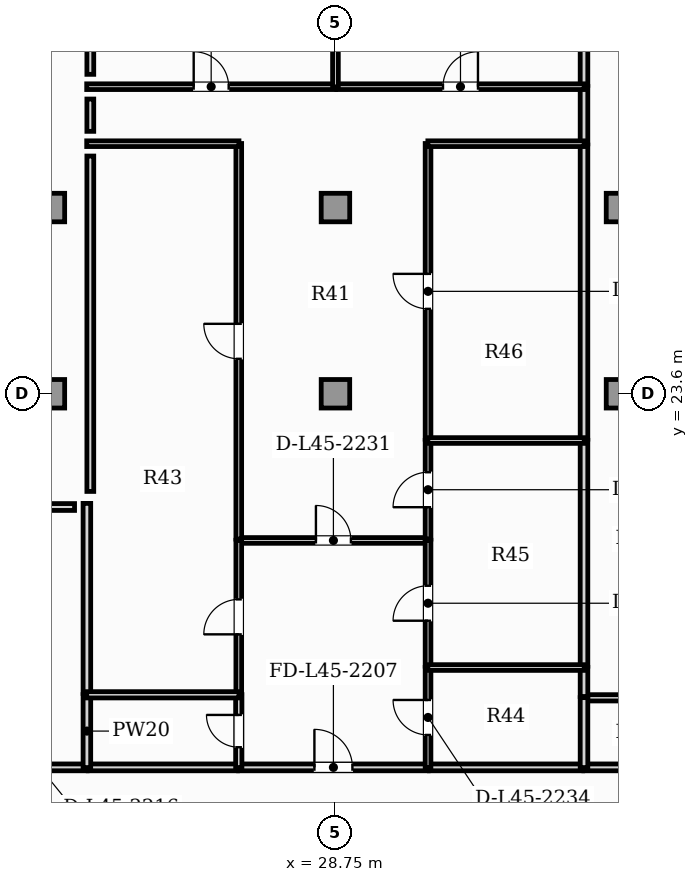
"""IFC4 building model, lengths in metres.
Left out: names, types, materials, properties, quantities, classifications, styles, units other than length and angle.
Written with IfcOpenShell. Run it as: python <this file> out.ifc"""

import sys

from ifc_helpers import new_model, si_unit, direction, frame, frame_2d, origin, origin_2d, place, context, subcontext, project, spatial, rectangle, extrude, element, fill, save


model = new_model("IFC4")
c1 = context("Model", 3, precision=1e-05, world=origin(), true_north=direction((0.0, 1.0)))
c2 = subcontext(c1, "Body", "Model", "MODEL_VIEW")
j1 = project(units=[si_unit("LENGTHUNIT", "METRE"), si_unit("PLANEANGLEUNIT", "RADIAN")], contexts=[c1])
p1 = place(None, origin())
s1 = spatial("IfcSite", under=j1, at=p1, CompositionType="ELEMENT")
p2 = place(p1, origin())
s2 = spatial("IfcBuilding", under=s1, at=p2, CompositionType="ELEMENT")
p3 = place(p2, frame((0.0, 0.0, 183.7)))
s3 = spatial("IfcBuildingStorey", under=s2, at=p3, CompositionType="ELEMENT", Elevation=183.7)
for number, where, z_axis, x_axis in (
    (1, (21.25, 23.6, 0.0), (0.0, 0.0, 1.0), (1.0, 0.0, 0.0)),
    (2, (28.75, 23.6, 0.0), (0.0, 0.0, 1.0), (1.0, 0.0, 0.0)),
    (3, (36.25, 23.6, 0.0), (0.0, 0.0, 1.0), (1.0, 0.0, 0.0)),
    (4, (21.25, 28.5, 0.0), (0.0, 0.0, 1.0), (1.0, 0.0, 0.0)),
    (5, (28.75, 28.5, 0.0), (0.0, 0.0, 1.0), (1.0, 0.0, 0.0)),
    (6, (36.25, 28.5, 0.0), (0.0, 0.0, 1.0), (1.0, 0.0, 0.0)),
):
    element("IfcColumn", number, at=place(p3, frame(where, z_axis=z_axis, x_axis=x_axis)), inside=s3, PredefinedType="COLUMN", context=c2, shape_type="SweptSolid", body=[
        extrude(rectangle(XDim=0.75, YDim=0.75, at=origin_2d()), origin(), (0.0, 0.0, 1.0), 3.85),
    ])
p4 = place(p3, frame((20.645, 13.77, 0.0), z_axis=(0.0, 0.0, 1.0), x_axis=(1.0, 0.0, 0.0)))
e7 = element("IfcWall", 7, at=p4, inside=s3, PredefinedType="PARTITIONING", context=c2, shape_type="SweptSolid", body=[
    extrude(rectangle(XDim=1.57, YDim=0.18, at=frame_2d((0.785, 0.0))), origin(), (0.0, 0.0, 1.0), 3.63),
])
p5 = place(p3, frame((35.285, 13.77, 0.0), z_axis=(0.0, 0.0, 1.0), x_axis=(1.0, 0.0, 0.0)))
e8 = element("IfcWall", 8, at=p5, inside=s3, PredefinedType="PARTITIONING", context=c2, shape_type="SweptSolid", body=[
    extrude(rectangle(XDim=5.57, YDim=0.18, at=frame_2d((2.785, 0.0))), origin(), (0.0, 0.0, 1.0), 3.63),
])
p6 = place(p3, frame((26.201, 13.77, 0.0), z_axis=(0.0, 0.0, 1.0), x_axis=(1.0, 0.0, 0.0)))
e9 = element("IfcWall", 9, at=p6, inside=s3, PredefinedType="PARTITIONING", context=c2, shape_type="SweptSolid", body=[
    extrude(rectangle(XDim=4.99, YDim=0.18, at=frame_2d((2.495, 0.0))), origin(), (0.0, 0.0, 1.0), 3.63),
])
p7 = place(p6, frame((1.995, 0.0, 0.0)))
e10 = element("IfcOpeningElement", 10, at=p7, cuts=e9, PredefinedType="OPENING", context=c2, shape_type="SweptSolid", body=[
    extrude(rectangle(XDim=1.0, YDim=2.15, at=frame_2d((0.5, 1.075))), frame((0.0, 0.1, 0.0), z_axis=(0.0, -1.0, 0.0), x_axis=(1.0, 0.0, 0.0)), (0.0, 0.0, 1.0), 0.2),
])
p8 = place(p3, frame((22.245, 13.77, 0.0), z_axis=(0.0, 0.0, 1.0), x_axis=(1.0, 0.0, 0.0)))
e11 = element("IfcWall", 11, at=p8, inside=s3, PredefinedType="PARTITIONING", context=c2, shape_type="SweptSolid", body=[
    extrude(rectangle(XDim=3.926, YDim=0.18, at=frame_2d((1.963, 0.0))), origin(), (0.0, 0.0, 1.0), 3.63),
])
p9 = place(p3, frame((31.221, 13.77, 0.0), z_axis=(0.0, 0.0, 1.0), x_axis=(1.0, 0.0, 0.0)))
e12 = element("IfcWall", 12, at=p9, inside=s3, PredefinedType="PARTITIONING", context=c2, shape_type="SweptSolid", body=[
    extrude(rectangle(XDim=4.034, YDim=0.18, at=frame_2d((2.017, 0.0))), origin(), (0.0, 0.0, 1.0), 3.63),
])
p10 = place(p3, frame((22.21, 13.765, 0.0), z_axis=(0.0, 0.0, 1.0), x_axis=(0.0, 1.0, 0.0)))
e13 = element("IfcWall", 13, at=p10, inside=s3, PredefinedType="PARTITIONING", context=c2, shape_type="SweptSolid", body=[
    extrude(rectangle(XDim=1.919, YDim=0.2, at=frame_2d((0.96, 0.0))), origin(), (0.0, 0.0, 1.0), 3.63),
])
p11 = place(p3, frame((22.21, 15.714, 0.0), z_axis=(0.0, 0.0, 1.0), x_axis=(0.0, 1.0, 0.0)))
e14 = element("IfcWall", 14, at=p11, inside=s3, PredefinedType="PARTITIONING", context=c2, shape_type="SweptSolid", body=[
    extrude(rectangle(XDim=5.001, YDim=0.2, at=frame_2d((2.5, 0.0))), origin(), (0.0, 0.0, 1.0), 3.63),
])
p12 = place(p3, frame((35.285, 15.6, 0.0), z_axis=(0.0, 0.0, 1.0), x_axis=(1.0, 0.0, 0.0)))
e15 = element("IfcWall", 15, at=p12, inside=s3, PredefinedType="PLUMBINGWALL", context=c2, shape_type="SweptSolid", body=[
    extrude(rectangle(XDim=5.61, YDim=0.165, at=frame_2d((2.805, 0.0))), origin(), (0.0, 0.0, 1.0), 3.63),
])
p13 = place(p3, frame((35.29, 13.765, 0.0), z_axis=(0.0, 0.0, 1.0), x_axis=(0.0, 1.0, 0.0)))
e16 = element("IfcWall", 16, at=p13, inside=s3, PredefinedType="PARTITIONING", context=c2, shape_type="SweptSolid", body=[
    extrude(rectangle(XDim=1.84, YDim=0.2, at=frame_2d((0.92, 0.0))), origin(), (0.0, 0.0, 1.0), 3.63),
])
p14 = place(p3, frame((35.29, 30.175, 0.0), z_axis=(0.0, 0.0, 1.0), x_axis=(0.0, 1.0, 0.0)))
e17 = element("IfcWall", 17, at=p14, inside=s3, PredefinedType="PARTITIONING", context=c2, shape_type="SweptSolid", body=[
    extrude(rectangle(XDim=1.51, YDim=0.2, at=frame_2d((0.755, 0.0))), origin(), (0.0, 0.0, 1.0), 3.63),
])
p15 = place(p3, frame((35.29, 15.635, 0.0), z_axis=(0.0, 0.0, 1.0), x_axis=(0.0, 1.0, 0.0)))
e18 = element("IfcWall", 18, at=p15, inside=s3, PredefinedType="PARTITIONING", context=c2, shape_type="SweptSolid", body=[
    extrude(rectangle(XDim=0.767, YDim=0.2, at=frame_2d((0.383, 0.0))), origin(), (0.0, 0.0, 1.0), 3.63),
])
p16 = place(p3, frame((35.29, 16.432, 0.0), z_axis=(0.0, 0.0, 1.0), x_axis=(0.0, 1.0, 0.0)))
e19 = element("IfcWall", 19, at=p16, inside=s3, PredefinedType="PARTITIONING", context=c2, shape_type="SweptSolid", body=[
    extrude(rectangle(XDim=5.943, YDim=0.2, at=frame_2d((2.972, 0.0))), origin(), (0.0, 0.0, 1.0), 3.63),
])
p17 = place(p3, frame((35.29, 22.405, 0.0), z_axis=(0.0, 0.0, 1.0), x_axis=(0.0, 1.0, 0.0)))
e20 = element("IfcWall", 20, at=p17, inside=s3, PredefinedType="PARTITIONING", context=c2, shape_type="SweptSolid", body=[
    extrude(rectangle(XDim=7.74, YDim=0.2, at=frame_2d((3.87, 0.0))), origin(), (0.0, 0.0, 1.0), 3.63),
])
p18 = place(p3, frame((35.29, 31.715, 0.0), z_axis=(0.0, 0.0, 1.0), x_axis=(0.0, 1.0, 0.0)))
e21 = element("IfcWall", 21, at=p18, inside=s3, PredefinedType="PARTITIONING", context=c2, shape_type="SweptSolid", body=[
    extrude(rectangle(XDim=1.75, YDim=0.2, at=frame_2d((0.875, 0.0))), origin(), (0.0, 0.0, 1.0), 3.63),
])
p19 = place(p3, frame((26.201, 19.741, 0.0), z_axis=(0.0, 0.0, 1.0), x_axis=(1.0, 0.0, 0.0)))
e22 = element("IfcWall", 22, at=p19, inside=s3, PredefinedType="PARTITIONING", context=c2, shape_type="SweptSolid", body=[
    extrude(rectangle(XDim=4.99, YDim=0.15, at=frame_2d((2.495, 0.0))), origin(), (0.0, 0.0, 1.0), 3.63),
])
p20 = place(p19, frame((2.035, 0.0, 0.0)))
e23 = element("IfcOpeningElement", 23, at=p20, cuts=e22, PredefinedType="OPENING", context=c2, shape_type="SweptSolid", body=[
    extrude(rectangle(XDim=0.92, YDim=2.1, at=frame_2d((0.46, 1.05))), frame((0.0, 0.085, 0.0), z_axis=(0.0, -1.0, 0.0), x_axis=(1.0, 0.0, 0.0)), (0.0, 0.0, 1.0), 0.17),
])
p21 = place(p3, frame((26.206, 13.765, 0.0), z_axis=(0.0, 0.0, 1.0), x_axis=(0.0, 1.0, 0.0)))
e24 = element("IfcWall", 24, at=p21, inside=s3, PredefinedType="PLUMBINGWALL", context=c2, shape_type="SweptSolid", body=[
    extrude(rectangle(XDim=1.919, YDim=0.165, at=frame_2d((0.96, 0.0))), origin(), (0.0, 0.0, 1.0), 3.63),
])
p22 = place(p21, frame((0.535, 0.0, 0.0)))
e25 = element("IfcOpeningElement", 25, at=p22, cuts=e24, PredefinedType="OPENING", context=c2, shape_type="SweptSolid", body=[
    extrude(rectangle(XDim=0.85, YDim=2.1, at=frame_2d((0.425, 1.05))), frame((0.0, 0.093, 0.0), z_axis=(0.0, -1.0, 0.0), x_axis=(1.0, 0.0, 0.0)), (0.0, 0.0, 1.0), 0.185),
])
p23 = place(p3, frame((26.206, 15.714, 0.0), z_axis=(0.0, 0.0, 1.0), x_axis=(0.0, 1.0, 0.0)))
e26 = element("IfcWall", 26, at=p23, inside=s3, PredefinedType="PARTITIONING", context=c2, shape_type="SweptSolid", body=[
    extrude(rectangle(XDim=4.031, YDim=0.15, at=frame_2d((2.016, 0.0))), origin(), (0.0, 0.0, 1.0), 3.63),
])
p24 = place(p23, frame((1.556, 0.0, 0.0)))
e27 = element("IfcOpeningElement", 27, at=p24, cuts=e26, PredefinedType="OPENING", context=c2, shape_type="SweptSolid", body=[
    extrude(rectangle(XDim=0.92, YDim=2.1, at=frame_2d((0.46, 1.05))), frame((0.0, 0.085, 0.0), z_axis=(0.0, -1.0, 0.0), x_axis=(1.0, 0.0, 0.0)), (0.0, 0.0, 1.0), 0.17),
])
p25 = place(p3, frame((31.186, 13.765, 0.0), z_axis=(0.0, 0.0, 1.0), x_axis=(0.0, 1.0, 0.0)))
e28 = element("IfcWall", 28, at=p25, inside=s3, PredefinedType="PARTITIONING", context=c2, shape_type="SweptSolid", body=[
    extrude(rectangle(XDim=2.637, YDim=0.15, at=frame_2d((1.318, 0.0))), origin(), (0.0, 0.0, 1.0), 3.63),
])
p26 = place(p25, frame((0.858, 0.0, 0.0)))
e29 = element("IfcOpeningElement", 29, at=p26, cuts=e28, PredefinedType="OPENING", context=c2, shape_type="SweptSolid", body=[
    extrude(rectangle(XDim=0.92, YDim=2.1, at=frame_2d((0.46, 1.05))), frame((0.0, 0.085, 0.0), z_axis=(0.0, -1.0, 0.0), x_axis=(1.0, 0.0, 0.0)), (0.0, 0.0, 1.0), 0.17),
])
p27 = place(p3, frame((31.186, 16.432, 0.0), z_axis=(0.0, 0.0, 1.0), x_axis=(0.0, 1.0, 0.0)))
e30 = element("IfcWall", 30, at=p27, inside=s3, PredefinedType="PARTITIONING", context=c2, shape_type="SweptSolid", body=[
    extrude(rectangle(XDim=3.314, YDim=0.15, at=frame_2d((1.657, 0.0))), origin(), (0.0, 0.0, 1.0), 3.63),
])
p28 = place(p27, frame((1.197, 0.0, 0.0)))
e31 = element("IfcOpeningElement", 31, at=p28, cuts=e30, PredefinedType="OPENING", context=c2, shape_type="SweptSolid", body=[
    extrude(rectangle(XDim=0.92, YDim=2.1, at=frame_2d((0.46, 1.05))), frame((0.0, 0.085, 0.0), z_axis=(0.0, -1.0, 0.0), x_axis=(1.0, 0.0, 0.0)), (0.0, 0.0, 1.0), 0.17),
])
p29 = place(p3, frame((26.206, 19.776, 0.0), z_axis=(0.0, 0.0, 1.0), x_axis=(0.0, 1.0, 0.0)))
e32 = element("IfcWall", 32, at=p29, inside=s3, PredefinedType="PARTITIONING", context=c2, shape_type="SweptSolid", body=[
    extrude(rectangle(XDim=10.409, YDim=0.15, at=frame_2d((5.205, 0.0))), origin(), (0.0, 0.0, 1.0), 3.63),
])
p30 = place(p29, frame((4.745, 0.0, 0.0)))
e33 = element("IfcOpeningElement", 33, at=p30, cuts=e32, PredefinedType="OPENING", context=c2, shape_type="SweptSolid", body=[
    extrude(rectangle(XDim=0.92, YDim=2.1, at=frame_2d((0.46, 1.05))), frame((0.0, 0.085, 0.0), z_axis=(0.0, -1.0, 0.0), x_axis=(1.0, 0.0, 0.0)), (0.0, 0.0, 1.0), 0.17),
])
p31 = place(p3, frame((22.205, 30.18, 0.0), z_axis=(0.0, 0.0, 1.0), x_axis=(1.0, 0.0, 0.0)))
e34 = element("IfcWall", 34, at=p31, inside=s3, PredefinedType="PARTITIONING", context=c2, shape_type="SweptSolid", body=[
    extrude(rectangle(XDim=4.006, YDim=0.15, at=frame_2d((2.003, 0.0))), origin(), (0.0, 0.0, 1.0), 3.63),
])
p32 = place(p3, frame((31.186, 19.776, 0.0), z_axis=(0.0, 0.0, 1.0), x_axis=(0.0, 1.0, 0.0)))
e35 = element("IfcWall", 35, at=p32, inside=s3, PredefinedType="PARTITIONING", context=c2, shape_type="SweptSolid", body=[
    extrude(rectangle(XDim=2.599, YDim=0.15, at=frame_2d((1.3, 0.0))), origin(), (0.0, 0.0, 1.0), 3.63),
])
p33 = place(p32, frame((0.84, 0.0, 0.0)))
e36 = element("IfcOpeningElement", 36, at=p33, cuts=e35, PredefinedType="OPENING", context=c2, shape_type="SweptSolid", body=[
    extrude(rectangle(XDim=0.92, YDim=2.1, at=frame_2d((0.46, 1.05))), frame((0.0, 0.085, 0.0), z_axis=(0.0, -1.0, 0.0), x_axis=(1.0, 0.0, 0.0)), (0.0, 0.0, 1.0), 0.17),
])
p34 = place(p3, frame((31.186, 22.405, 0.0), z_axis=(0.0, 0.0, 1.0), x_axis=(0.0, 1.0, 0.0)))
e37 = element("IfcWall", 37, at=p34, inside=s3, PredefinedType="PARTITIONING", context=c2, shape_type="SweptSolid", body=[
    extrude(rectangle(XDim=7.78, YDim=0.15, at=frame_2d((3.89, 0.0))), origin(), (0.0, 0.0, 1.0), 3.63),
])
p35 = place(p34, frame((3.43, 0.0, 0.0)))
e38 = element("IfcOpeningElement", 38, at=p35, cuts=e37, PredefinedType="OPENING", context=c2, shape_type="SweptSolid", body=[
    extrude(rectangle(XDim=0.92, YDim=2.1, at=frame_2d((0.46, 1.05))), frame((0.0, 0.085, 0.0), z_axis=(0.0, -1.0, 0.0), x_axis=(1.0, 0.0, 0.0)), (0.0, 0.0, 1.0), 0.17),
])
p36 = place(p3, frame((31.181, 30.18, 0.0), z_axis=(0.0, 0.0, 1.0), x_axis=(1.0, 0.0, 0.0)))
e39 = element("IfcWall", 39, at=p36, inside=s3, PredefinedType="PARTITIONING", context=c2, shape_type="SweptSolid", body=[
    extrude(rectangle(XDim=4.114, YDim=0.15, at=frame_2d((2.057, 0.0))), origin(), (0.0, 0.0, 1.0), 3.63),
])
p37 = place(p3, frame((22.205, 31.68, 0.0), z_axis=(0.0, 0.0, 1.0), x_axis=(1.0, 0.0, 0.0)))
e40 = element("IfcWall", 40, at=p37, inside=s3, PredefinedType="PARTITIONING", context=c2, shape_type="SweptSolid", body=[
    extrude(rectangle(XDim=6.55, YDim=0.15, at=frame_2d((3.275, 0.0))), origin(), (0.0, 0.0, 1.0), 3.63),
])
p38 = place(p37, frame((2.815, 0.0, 0.0)))
e41 = element("IfcOpeningElement", 41, at=p38, cuts=e40, PredefinedType="OPENING", context=c2, shape_type="SweptSolid", body=[
    extrude(rectangle(XDim=0.92, YDim=2.1, at=frame_2d((0.46, 1.05))), frame((0.0, 0.085, 0.0), z_axis=(0.0, -1.0, 0.0), x_axis=(1.0, 0.0, 0.0)), (0.0, 0.0, 1.0), 0.17),
])
p39 = place(p3, frame((28.785, 31.68, 0.0), z_axis=(0.0, 0.0, 1.0), x_axis=(1.0, 0.0, 0.0)))
e42 = element("IfcWall", 42, at=p39, inside=s3, PredefinedType="PARTITIONING", context=c2, shape_type="SweptSolid", body=[
    extrude(rectangle(XDim=6.51, YDim=0.15, at=frame_2d((3.255, 0.0))), origin(), (0.0, 0.0, 1.0), 3.63),
])
p40 = place(p39, frame((2.795, 0.0, 0.0)))
e43 = element("IfcOpeningElement", 43, at=p40, cuts=e42, PredefinedType="OPENING", context=c2, shape_type="SweptSolid", body=[
    extrude(rectangle(XDim=0.92, YDim=2.1, at=frame_2d((0.46, 1.05))), frame((0.0, 0.085, 0.0), z_axis=(0.0, -1.0, 0.0), x_axis=(1.0, 0.0, 0.0)), (0.0, 0.0, 1.0), 0.17),
])
p41 = place(p3, frame((22.205, 15.679, 0.0), z_axis=(0.0, 0.0, 1.0), x_axis=(1.0, 0.0, 0.0)))
e44 = element("IfcWall", 44, at=p41, inside=s3, PredefinedType="PLUMBINGWALL", context=c2, shape_type="SweptSolid", body=[
    extrude(rectangle(XDim=4.006, YDim=0.165, at=frame_2d((2.003, 0.0))), origin(), (0.0, 0.0, 1.0), 3.63),
])
for number, where, z_axis, x_axis in (
    (45, (31.181, 16.397, 0.0), (0.0, 0.0, 1.0), (1.0, 0.0, 0.0)),
    (46, (31.181, 22.37, 0.0), (0.0, 0.0, 1.0), (1.0, 0.0, 0.0)),
):
    element("IfcWall", number, at=place(p3, frame(where, z_axis=z_axis, x_axis=x_axis)), inside=s3, PredefinedType="PARTITIONING", context=c2, shape_type="SweptSolid", body=[
        extrude(rectangle(XDim=4.114, YDim=0.15, at=frame_2d((2.057, 0.0))), origin(), (0.0, 0.0, 1.0), 3.63),
    ])
p42 = place(p3, frame((28.75, 31.675, 0.0), z_axis=(0.0, 0.0, 1.0), x_axis=(0.0, 1.0, 0.0)))
e47 = element("IfcWall", 47, at=p42, inside=s3, PredefinedType="PARTITIONING", context=c2, shape_type="SweptSolid", body=[
    extrude(rectangle(XDim=5.152, YDim=0.15, at=frame_2d((2.576, 0.0))), origin(), (0.0, 0.0, 1.0), 3.224),
])
p43 = place(p3, frame((20.935, 20.621, 0.0), z_axis=(0.0, 0.0, 1.0), x_axis=(1.0, 0.0, 0.0)))
e48 = element("IfcWall", 48, at=p43, inside=s3, PredefinedType="PARTITIONING", context=c2, shape_type="SweptSolid", body=[
    extrude(rectangle(XDim=0.95, YDim=0.18, at=frame_2d((0.475, 0.0))), origin(), (0.0, 0.0, 1.0), 3.63),
])
p44 = place(p3, frame((22.3, 30.505, 0.0), z_axis=(0.0, 0.0, 1.0), x_axis=(0.0, 1.0, 0.0)))
e49 = element("IfcWall", 49, at=p44, inside=s3, PredefinedType="PARTITIONING", context=c2, shape_type="SweptSolid", body=[
    extrude(rectangle(XDim=0.85, YDim=0.18, at=frame_2d((0.425, 0.0))), origin(), (0.0, 0.0, 1.0), 3.63),
])
p45 = place(p3, frame((22.3, 21.031, 0.0), z_axis=(0.0, 0.0, 1.0), x_axis=(0.0, 1.0, 0.0)))
e50 = element("IfcWall", 50, at=p45, inside=s3, PredefinedType="PARTITIONING", context=c2, shape_type="SweptSolid", body=[
    extrude(rectangle(XDim=8.824, YDim=0.18, at=frame_2d((4.412, 0.0))), origin(), (0.0, 0.0, 1.0), 3.63),
])
p46 = place(p3, frame((22.3, 32.005, 0.0), z_axis=(0.0, 0.0, 1.0), x_axis=(0.0, 1.0, 0.0)))
e51 = element("IfcWall", 51, at=p46, inside=s3, PredefinedType="PARTITIONING", context=c2, shape_type="SweptSolid", body=[
    extrude(rectangle(XDim=1.175, YDim=0.18, at=frame_2d((0.588, 0.0))), origin(), (0.0, 0.0, 1.0), 3.63),
])
p47 = place(p7, origin())
e52 = element("IfcDoor", 52, at=p47, inside=s3, OperationType="SINGLE_SWING_LEFT", PredefinedType="DOOR", context=c2, shape_type="SweptSolid", body=[
    extrude(rectangle(XDim=1.0, YDim=2.15, at=frame_2d((0.5, 1.075))), frame((0.0, 0.025, 0.0), z_axis=(0.0, -1.0, 0.0), x_axis=(1.0, 0.0, 0.0)), (0.0, 0.0, 1.0), 0.05),
])
fill(e10, e52)
p48 = place(p20, origin())
e53 = element("IfcDoor", 53, at=p48, inside=s3, OperationType="SINGLE_SWING_LEFT", PredefinedType="DOOR", context=c2, shape_type="SweptSolid", body=[
    extrude(rectangle(XDim=0.92, YDim=2.1, at=frame_2d((0.46, 1.05))), frame((0.0, 0.025, 0.0), z_axis=(0.0, -1.0, 0.0), x_axis=(1.0, 0.0, 0.0)), (0.0, 0.0, 1.0), 0.05),
])
fill(e23, e53)
p49 = place(p22, origin())
e54 = element("IfcDoor", 54, at=p49, inside=s3, OperationType="SINGLE_SWING_RIGHT", PredefinedType="DOOR", context=c2, shape_type="SweptSolid", body=[
    extrude(rectangle(XDim=0.85, YDim=2.1, at=frame_2d((0.425, 1.05))), frame((0.0, 0.025, 0.0), z_axis=(0.0, -1.0, 0.0), x_axis=(1.0, 0.0, 0.0)), (0.0, 0.0, 1.0), 0.05),
])
fill(e25, e54)
p50 = place(p24, origin())
e55 = element("IfcDoor", 55, at=p50, inside=s3, OperationType="SINGLE_SWING_LEFT", PredefinedType="DOOR", context=c2, shape_type="SweptSolid", body=[
    extrude(rectangle(XDim=0.92, YDim=2.1, at=frame_2d((0.46, 1.05))), frame((0.0, 0.025, 0.0), z_axis=(0.0, -1.0, 0.0), x_axis=(1.0, 0.0, 0.0)), (0.0, 0.0, 1.0), 0.05),
])
fill(e27, e55)
p51 = place(p26, origin())
e56 = element("IfcDoor", 56, at=p51, inside=s3, OperationType="SINGLE_SWING_RIGHT", PredefinedType="DOOR", context=c2, shape_type="SweptSolid", body=[
    extrude(rectangle(XDim=0.92, YDim=2.1, at=frame_2d((0.46, 1.05))), frame((0.0, 0.025, 0.0), z_axis=(0.0, -1.0, 0.0), x_axis=(1.0, 0.0, 0.0)), (0.0, 0.0, 1.0), 0.05),
])
fill(e29, e56)
p52 = place(p28, origin())
e57 = element("IfcDoor", 57, at=p52, inside=s3, OperationType="SINGLE_SWING_LEFT", PredefinedType="DOOR", context=c2, shape_type="SweptSolid", body=[
    extrude(rectangle(XDim=0.92, YDim=2.1, at=frame_2d((0.46, 1.05))), frame((0.0, 0.025, 0.0), z_axis=(0.0, -1.0, 0.0), x_axis=(1.0, 0.0, 0.0)), (0.0, 0.0, 1.0), 0.05),
])
fill(e31, e57)
p53 = place(p30, origin())
e58 = element("IfcDoor", 58, at=p53, inside=s3, OperationType="SINGLE_SWING_RIGHT", PredefinedType="DOOR", context=c2, shape_type="SweptSolid", body=[
    extrude(rectangle(XDim=0.92, YDim=2.1, at=frame_2d((0.46, 1.05))), frame((0.0, 0.025, 0.0), z_axis=(0.0, -1.0, 0.0), x_axis=(1.0, 0.0, 0.0)), (0.0, 0.0, 1.0), 0.05),
])
fill(e33, e58)
p54 = place(p33, origin())
e59 = element("IfcDoor", 59, at=p54, inside=s3, OperationType="SINGLE_SWING_LEFT", PredefinedType="DOOR", context=c2, shape_type="SweptSolid", body=[
    extrude(rectangle(XDim=0.92, YDim=2.1, at=frame_2d((0.46, 1.05))), frame((0.0, 0.025, 0.0), z_axis=(0.0, -1.0, 0.0), x_axis=(1.0, 0.0, 0.0)), (0.0, 0.0, 1.0), 0.05),
])
fill(e36, e59)
p55 = place(p35, origin())
e60 = element("IfcDoor", 60, at=p55, inside=s3, OperationType="SINGLE_SWING_RIGHT", PredefinedType="DOOR", context=c2, shape_type="SweptSolid", body=[
    extrude(rectangle(XDim=0.92, YDim=2.1, at=frame_2d((0.46, 1.05))), frame((0.0, 0.025, 0.0), z_axis=(0.0, -1.0, 0.0), x_axis=(1.0, 0.0, 0.0)), (0.0, 0.0, 1.0), 0.05),
])
fill(e38, e60)
p56 = place(p38, origin())
e61 = element("IfcDoor", 61, at=p56, inside=s3, OperationType="SINGLE_SWING_LEFT", PredefinedType="DOOR", context=c2, shape_type="SweptSolid", body=[
    extrude(rectangle(XDim=0.92, YDim=2.1, at=frame_2d((0.46, 1.05))), frame((0.0, 0.025, 0.0), z_axis=(0.0, -1.0, 0.0), x_axis=(1.0, 0.0, 0.0)), (0.0, 0.0, 1.0), 0.05),
])
fill(e41, e61)
p57 = place(p40, origin())
e62 = element("IfcDoor", 62, at=p57, inside=s3, OperationType="SINGLE_SWING_RIGHT", PredefinedType="DOOR", context=c2, shape_type="SweptSolid", body=[
    extrude(rectangle(XDim=0.92, YDim=2.1, at=frame_2d((0.46, 1.05))), frame((0.0, 0.025, 0.0), z_axis=(0.0, -1.0, 0.0), x_axis=(1.0, 0.0, 0.0)), (0.0, 0.0, 1.0), 0.05),
])
fill(e43, e62)
save(model, sys.argv[1])
